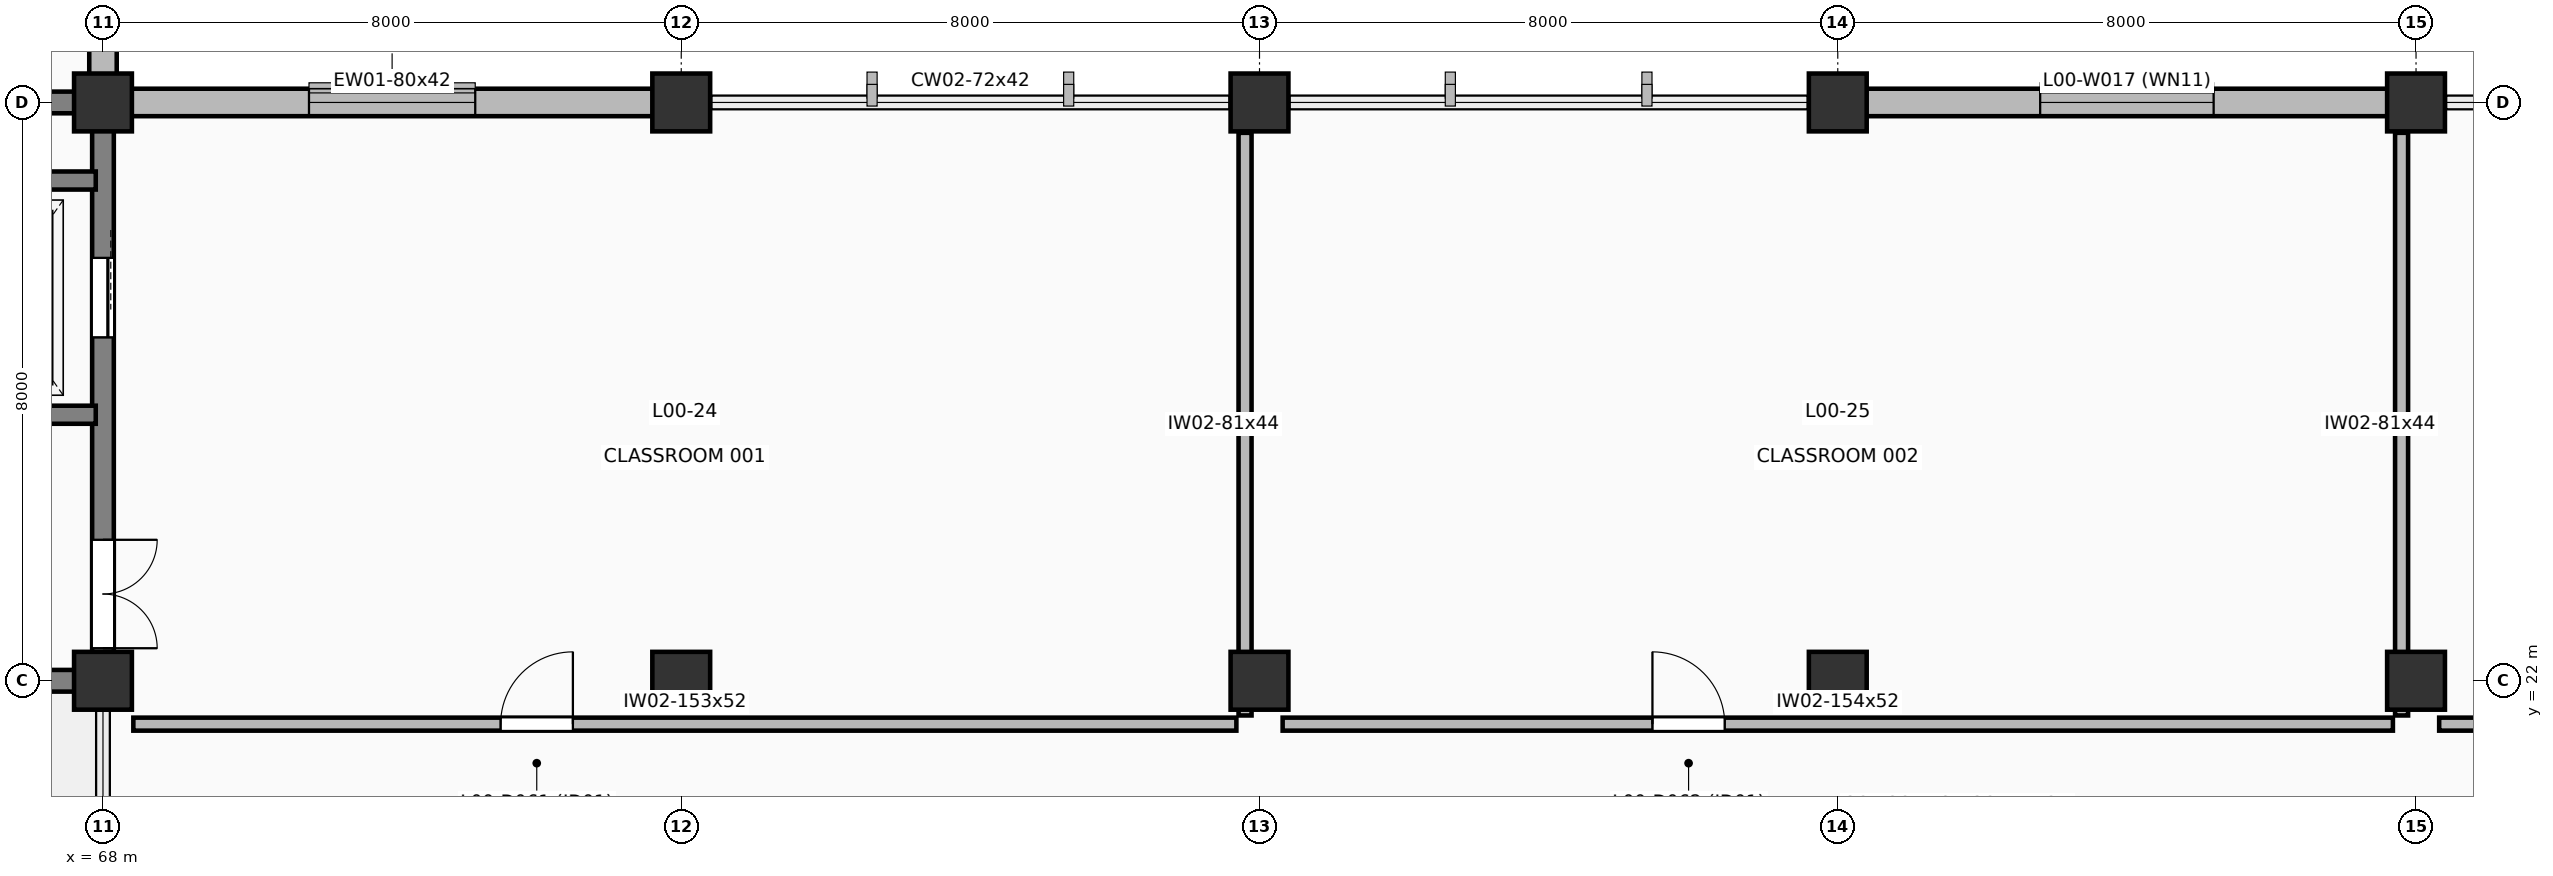
"""IFC4 building model, lengths in metres.
Left out: names, types, materials, properties, quantities, classifications, styles, units other than length and angle.
Written with IfcOpenShell. Run it as: python <this file> out.ifc"""

import sys

from ifc_helpers import new_model, si_unit, direction, frame, frame_2d, origin, origin_2d, place, context, subcontext, project, spatial, rectangle, extrude, element, fill, save


model = new_model("IFC4")
c1 = context("Model", 3, precision=1e-05, world=origin(), true_north=direction((0.0, 1.0)))
c2 = subcontext(c1, "Body", "Model", "MODEL_VIEW")
j1 = project(units=[si_unit("LENGTHUNIT", "METRE"), si_unit("PLANEANGLEUNIT", "RADIAN")], contexts=[c1])
p1 = place(None, origin())
s1 = spatial("IfcSite", under=j1, at=p1, CompositionType="ELEMENT")
p2 = place(p1, origin())
s2 = spatial("IfcBuilding", under=s1, at=p2, CompositionType="ELEMENT")
p3 = place(p2, origin())
s3 = spatial("IfcBuildingStorey", under=s2, at=p3, CompositionType="ELEMENT", Elevation=0.0)
for number, where, z_axis, x_axis in (
    (1, (68.0, 22.0, 0.0), (0.0, 0.0, 1.0), (1.0, 0.0, 0.0)),
    (2, (68.0, 30.0, 0.0), (0.0, 0.0, 1.0), (1.0, 0.0, 0.0)),
    (3, (76.0, 22.0, 0.0), (0.0, 0.0, 1.0), (1.0, 0.0, 0.0)),
    (4, (76.0, 30.0, 0.0), (0.0, 0.0, 1.0), (1.0, 0.0, 0.0)),
    (5, (84.0, 22.0, 0.0), (0.0, 0.0, 1.0), (1.0, 0.0, 0.0)),
    (6, (84.0, 30.0, 0.0), (0.0, 0.0, 1.0), (1.0, 0.0, 0.0)),
    (7, (92.0, 22.0, 0.0), (0.0, 0.0, 1.0), (1.0, 0.0, 0.0)),
    (8, (92.0, 30.0, 0.0), (0.0, 0.0, 1.0), (1.0, 0.0, 0.0)),
    (9, (100.0, 22.0, 0.0), (0.0, 0.0, 1.0), (1.0, 0.0, 0.0)),
    (10, (100.0, 30.0, 0.0), (0.0, 0.0, 1.0), (1.0, 0.0, 0.0)),
):
    element("IfcColumn", number, at=place(p3, frame(where, z_axis=z_axis, x_axis=x_axis)), inside=s3, PredefinedType="COLUMN", context=c2, shape_type="SweptSolid", body=[
        extrude(rectangle(XDim=0.8, YDim=0.8, at=origin_2d()), origin(), (0.0, 0.0, 1.0), 5.4),
    ])
p4 = place(p3, frame((68.0, 22.0, 0.0), z_axis=(0.0, 0.0, 1.0), x_axis=(-1.0, 0.0, 0.0)))
e11 = element("IfcWall", 11, at=p4, inside=s3, PredefinedType="SOLIDWALL", context=c2, shape_type="SweptSolid", body=[
    extrude(rectangle(XDim=8.0, YDim=0.3, at=frame_2d((4.0, 0.0))), origin(), (0.0, 0.0, 1.0), 5.4),
])
p5 = place(p3, frame((68.0, 38.0, 0.0), z_axis=(0.0, 0.0, 1.0), x_axis=(0.0, -1.0, 0.0)))
e12 = element("IfcWall", 12, at=p5, inside=s3, PredefinedType="SOLIDWALL", context=c2, shape_type="SweptSolid", body=[
    extrude(rectangle(XDim=8.0, YDim=0.38, at=frame_2d((4.0, 0.0))), origin(), (0.0, 0.0, 1.0), 4.425),
])
p6 = place(p5, frame((2.9, 0.0, 0.85)))
e13 = element("IfcOpeningElement", 13, at=p6, cuts=e12, PredefinedType="OPENING", context=c2, shape_type="SweptSolid", body=[
    extrude(rectangle(XDim=2.2, YDim=2.8, at=frame_2d((1.1, 1.4))), frame((0.0, 0.2, 0.0), z_axis=(0.0, -1.0, 0.0), x_axis=(1.0, 0.0, 0.0)), (0.0, 0.0, 1.0), 0.4),
])
p7 = place(p3, frame((68.0, 30.0, 0.0), z_axis=(0.0, 0.0, 1.0), x_axis=(1.0, 0.0, 0.0)))
e14 = element("IfcWall", 14, at=p7, inside=s3, PredefinedType="SOLIDWALL", context=c2, shape_type="SweptSolid", body=[
    extrude(rectangle(XDim=8.0, YDim=0.38, at=frame_2d((4.0, 0.0))), origin(), (0.0, 0.0, 1.0), 4.245),
])
p8 = place(p7, frame((2.85, 0.0, 0.9)))
e15 = element("IfcOpeningElement", 15, at=p8, cuts=e14, PredefinedType="OPENING", context=c2, shape_type="SweptSolid", body=[
    extrude(rectangle(XDim=2.3, YDim=2.6, at=frame_2d((1.15, 1.3))), frame((0.0, 0.2, 0.0), z_axis=(0.0, -1.0, 0.0), x_axis=(1.0, 0.0, 0.0)), (0.0, 0.0, 1.0), 0.4),
])
p9 = place(p3, frame((92.0, 30.0, 0.0), z_axis=(0.0, 0.0, 1.0), x_axis=(1.0, 0.0, 0.0)))
e16 = element("IfcWall", 16, at=p9, inside=s3, PredefinedType="SOLIDWALL", context=c2, shape_type="SweptSolid", body=[
    extrude(rectangle(XDim=8.0, YDim=0.38, at=frame_2d((4.0, 0.0))), origin(), (0.0, 0.0, 1.0), 4.245),
])
p10 = place(p9, frame((2.8, 0.0, 0.9)))
e17 = element("IfcOpeningElement", 17, at=p10, cuts=e16, PredefinedType="OPENING", context=c2, shape_type="SweptSolid", body=[
    extrude(rectangle(XDim=2.4, YDim=2.7, at=frame_2d((1.2, 1.35))), frame((0.0, 0.2, 0.0), z_axis=(0.0, -1.0, 0.0), x_axis=(1.0, 0.0, 0.0)), (0.0, 0.0, 1.0), 0.4),
])
p11 = place(p3, frame((60.0, 30.0, 0.0), z_axis=(0.0, 0.0, 1.0), x_axis=(1.0, 0.0, 0.0)))
e18 = element("IfcWall", 18, at=p11, inside=s3, PredefinedType="SHEAR", context=c2, shape_type="SweptSolid", body=[
    extrude(rectangle(XDim=8.0, YDim=0.3, at=frame_2d((4.0, 0.0))), origin(), (0.0, 0.0, 1.0), 5.4),
])
p12 = place(p3, frame((68.0, 30.0, 0.0), z_axis=(0.0, 0.0, 1.0), x_axis=(0.0, -1.0, 0.0)))
e19 = element("IfcWall", 19, at=p12, inside=s3, PredefinedType="SHEAR", context=c2, shape_type="SweptSolid", body=[
    extrude(rectangle(XDim=8.0, YDim=0.3, at=frame_2d((4.0, 0.0))), origin(), (0.0, 0.0, 1.0), 5.4),
])
p13 = place(p12, frame((6.05, 0.0, 0.0)))
e20 = element("IfcOpeningElement", 20, at=p13, cuts=e19, PredefinedType="OPENING", context=c2, shape_type="SweptSolid", body=[
    extrude(rectangle(XDim=1.5, YDim=2.2, at=frame_2d((0.75, 1.1))), frame((0.0, 0.16, 0.0), z_axis=(0.0, -1.0, 0.0), x_axis=(1.0, 0.0, 0.0)), (0.0, 0.0, 1.0), 0.32),
])
p14 = place(p12, frame((2.15, 0.0, 0.0)))
e21 = element("IfcOpeningElement", 21, at=p14, cuts=e19, PredefinedType="OPENING", context=c2, shape_type="SweptSolid", body=[
    extrude(rectangle(XDim=1.1, YDim=2.2, at=frame_2d((0.55, 1.1))), frame((0.0, 0.16, 0.0), z_axis=(0.0, -1.0, 0.0), x_axis=(1.0, 0.0, 0.0)), (0.0, 0.0, 1.0), 0.32),
])
for number, where, z_axis, x_axis in (
    (22, (65.2, 25.68, 0.0), (0.0, 0.0, 1.0), (1.0, 0.0, 0.0)),
    (23, (65.2, 28.92, 0.0), (0.0, 0.0, 1.0), (1.0, 0.0, 0.0)),
):
    element("IfcWall", number, at=place(p3, frame(where, z_axis=z_axis, x_axis=x_axis)), inside=s3, PredefinedType="SHEAR", context=c2, shape_type="SweptSolid", body=[
        extrude(rectangle(XDim=2.7, YDim=0.25, at=frame_2d((1.35, 0.0))), origin(), (0.0, 0.0, 1.0), 5.4),
    ])
p15 = place(p3, frame((68.42, 21.4, 0.0), z_axis=(0.0, 0.0, 1.0), x_axis=(1.0, 0.0, 0.0)))
e24 = element("IfcWall", 24, at=p15, inside=s3, PredefinedType="PARTITIONING", context=c2, shape_type="SweptSolid", body=[
    extrude(rectangle(XDim=15.26, YDim=0.18, at=frame_2d((7.63, 0.0))), origin(), (0.0, 0.0, 1.0), 5.16),
])
p16 = place(p15, frame((5.081, 0.0, 0.0)))
e25 = element("IfcOpeningElement", 25, at=p16, cuts=e24, PredefinedType="OPENING", context=c2, shape_type="SweptSolid", body=[
    extrude(rectangle(XDim=1.0, YDim=2.15, at=frame_2d((0.5, 1.075))), frame((0.0, 0.1, 0.0), z_axis=(0.0, -1.0, 0.0), x_axis=(1.0, 0.0, 0.0)), (0.0, 0.0, 1.0), 0.2),
])
p17 = place(p3, frame((83.8, 21.52, 0.0), z_axis=(0.0, 0.0, 1.0), x_axis=(0.0, 1.0, 0.0)))
e26 = element("IfcWall", 26, at=p17, inside=s3, PredefinedType="PARTITIONING", context=c2, shape_type="SweptSolid", body=[
    extrude(rectangle(XDim=8.06, YDim=0.18, at=frame_2d((4.03, 0.0))), origin(), (0.0, 0.0, 1.0), 4.445),
])
p18 = place(p3, frame((84.32, 21.4, 0.0), z_axis=(0.0, 0.0, 1.0), x_axis=(1.0, 0.0, 0.0)))
e27 = element("IfcWall", 27, at=p18, inside=s3, PredefinedType="PARTITIONING", context=c2, shape_type="SweptSolid", body=[
    extrude(rectangle(XDim=15.36, YDim=0.18, at=frame_2d((7.68, 0.0))), origin(), (0.0, 0.0, 1.0), 5.16),
])
p19 = place(p18, frame((5.116, 0.0, 0.0)))
e28 = element("IfcOpeningElement", 28, at=p19, cuts=e27, PredefinedType="OPENING", context=c2, shape_type="SweptSolid", body=[
    extrude(rectangle(XDim=1.0, YDim=2.15, at=frame_2d((0.5, 1.075))), frame((0.0, 0.1, 0.0), z_axis=(0.0, -1.0, 0.0), x_axis=(1.0, 0.0, 0.0)), (0.0, 0.0, 1.0), 0.2),
])
p20 = place(p3, frame((99.8, 21.52, 0.0), z_axis=(0.0, 0.0, 1.0), x_axis=(0.0, 1.0, 0.0)))
e29 = element("IfcWall", 29, at=p20, inside=s3, PredefinedType="PARTITIONING", context=c2, shape_type="SweptSolid", body=[
    extrude(rectangle(XDim=8.06, YDim=0.18, at=frame_2d((4.03, 0.0))), origin(), (0.0, 0.0, 1.0), 4.445),
])
p21 = place(p3, frame((100.32, 21.4, 0.0), z_axis=(0.0, 0.0, 1.0), x_axis=(1.0, 0.0, 0.0)))
e30 = element("IfcWall", 30, at=p21, inside=s3, PredefinedType="PARTITIONING", context=c2, shape_type="SweptSolid", body=[
    extrude(rectangle(XDim=19.56, YDim=0.18, at=frame_2d((9.78, 0.0))), origin(), (0.0, 0.0, 1.0), 5.16),
])
p22 = place(p21, frame((8.88, 0.0, 0.0)))
e31 = element("IfcOpeningElement", 31, at=p22, cuts=e30, PredefinedType="OPENING", context=c2, shape_type="SweptSolid", body=[
    extrude(rectangle(XDim=1.8, YDim=2.3, at=frame_2d((0.9, 1.15))), frame((0.0, 0.1, 0.0), z_axis=(0.0, -1.0, 0.0), x_axis=(1.0, 0.0, 0.0)), (0.0, 0.0, 1.0), 0.2),
])
p23 = place(p8, origin())
e32 = element("IfcWindow", 32, at=p23, inside=s3, PartitioningType="DOUBLE_PANEL_VERTICAL", PredefinedType="WINDOW", context=c2, shape_type="SweptSolid", body=[
    extrude(rectangle(XDim=2.3, YDim=2.6, at=frame_2d((1.15, 1.3))), frame((0.0, 0.03, 0.0), z_axis=(0.0, -1.0, 0.0), x_axis=(1.0, 0.0, 0.0)), (0.0, 0.0, 1.0), 0.06),
])
fill(e15, e32)
p24 = place(p10, origin())
e33 = element("IfcWindow", 33, at=p24, inside=s3, PartitioningType="DOUBLE_PANEL_VERTICAL", PredefinedType="WINDOW", context=c2, shape_type="SweptSolid", body=[
    extrude(rectangle(XDim=2.4, YDim=2.7, at=frame_2d((1.2, 1.35))), frame((0.0, 0.03, 0.0), z_axis=(0.0, -1.0, 0.0), x_axis=(1.0, 0.0, 0.0)), (0.0, 0.0, 1.0), 0.06),
])
fill(e17, e33)
p25 = place(p13, origin())
e34 = element("IfcDoor", 34, at=p25, inside=s3, OperationType="DOUBLE_DOOR_SINGLE_SWING", PredefinedType="DOOR", context=c2, shape_type="SweptSolid", body=[
    extrude(rectangle(XDim=1.5, YDim=2.2, at=frame_2d((0.75, 1.1))), frame((0.0, 0.025, 0.0), z_axis=(0.0, -1.0, 0.0), x_axis=(1.0, 0.0, 0.0)), (0.0, 0.0, 1.0), 0.05),
])
fill(e20, e34)
p26 = place(p14, origin())
e35 = element("IfcDoor", 35, at=p26, inside=s3, OperationType="SLIDING_TO_LEFT", PredefinedType="DOOR", context=c2, shape_type="SweptSolid", body=[
    extrude(rectangle(XDim=1.1, YDim=2.2, at=frame_2d((0.55, 1.1))), frame((0.0, 0.025, 0.0), z_axis=(0.0, -1.0, 0.0), x_axis=(1.0, 0.0, 0.0)), (0.0, 0.0, 1.0), 0.05),
])
fill(e21, e35)
p27 = place(p16, origin())
e36 = element("IfcDoor", 36, at=p27, inside=s3, OperationType="SINGLE_SWING_RIGHT", PredefinedType="DOOR", context=c2, shape_type="SweptSolid", body=[
    extrude(rectangle(XDim=1.0, YDim=2.15, at=frame_2d((0.5, 1.075))), frame((0.0, 0.025, 0.0), z_axis=(0.0, -1.0, 0.0), x_axis=(1.0, 0.0, 0.0)), (0.0, 0.0, 1.0), 0.05),
])
fill(e25, e36)
p28 = place(p19, origin())
e37 = element("IfcDoor", 37, at=p28, inside=s3, OperationType="SINGLE_SWING_LEFT", PredefinedType="DOOR", context=c2, shape_type="SweptSolid", body=[
    extrude(rectangle(XDim=1.0, YDim=2.15, at=frame_2d((0.5, 1.075))), frame((0.0, 0.025, 0.0), z_axis=(0.0, -1.0, 0.0), x_axis=(1.0, 0.0, 0.0)), (0.0, 0.0, 1.0), 0.05),
])
fill(e28, e37)
save(model, sys.argv[1])
